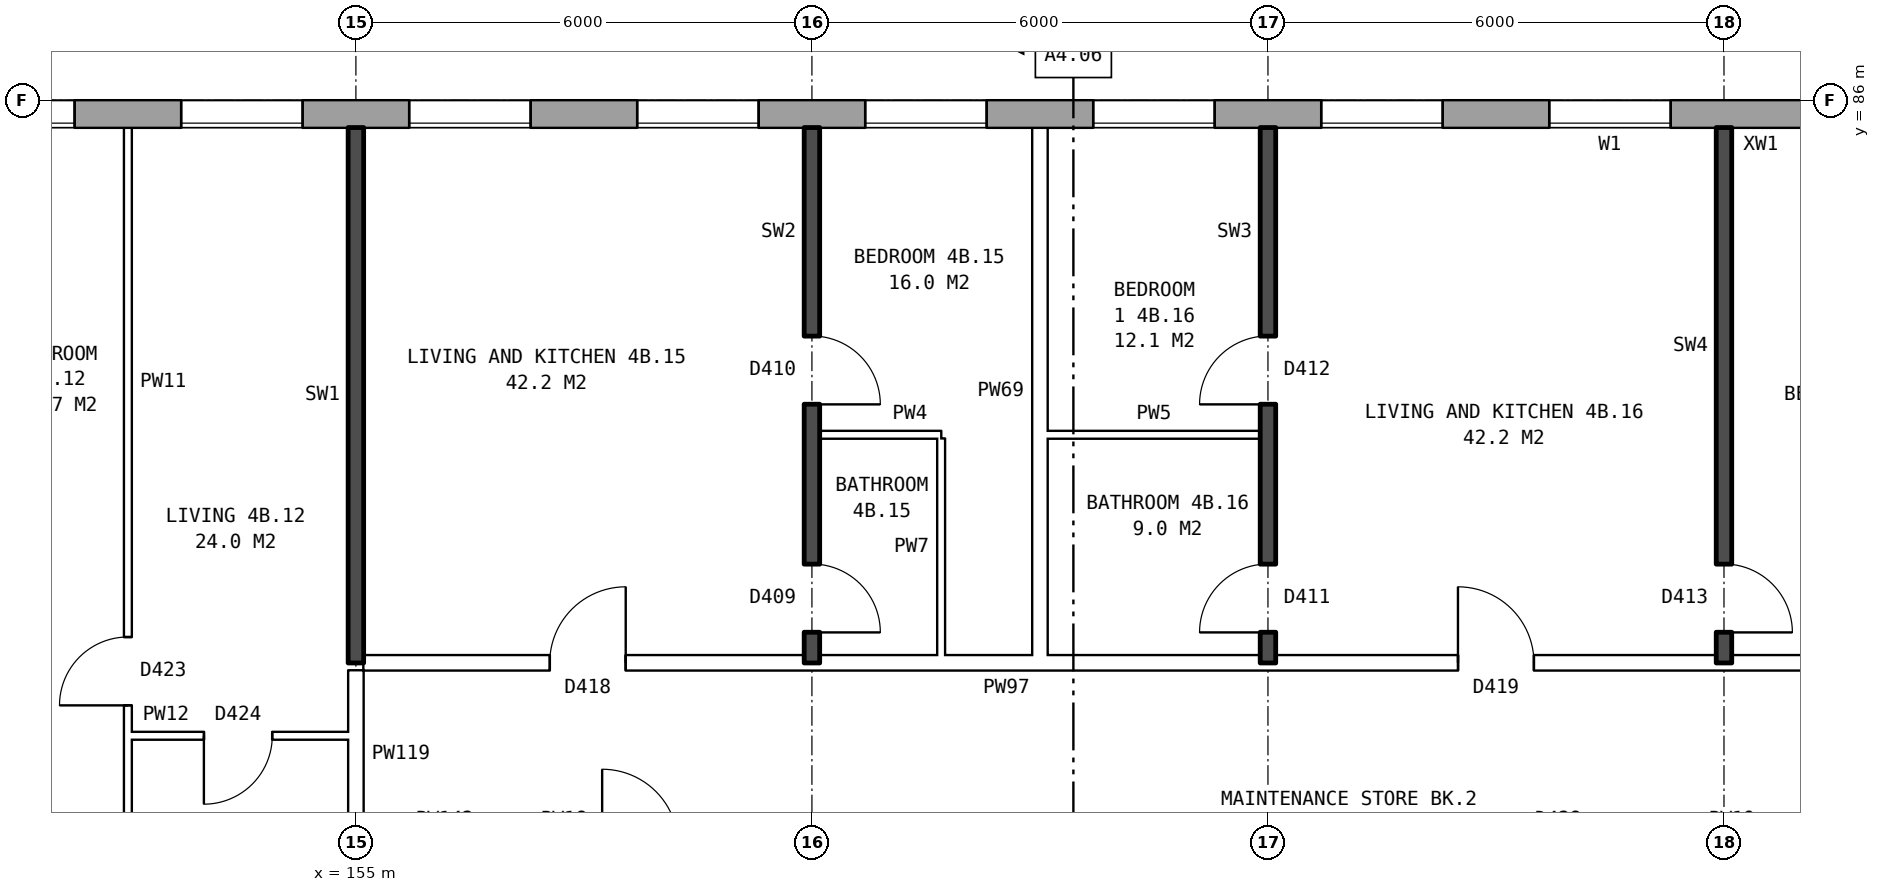
"""IFC4 building model, lengths in metres.
Left out: names, types, materials, properties, quantities, classifications, styles, units other than length and angle.
Written with IfcOpenShell. Run it as: python <this file> out.ifc"""

import sys

from ifc_helpers import new_model, si_unit, direction, frame, frame_2d, origin, place, context, subcontext, project, spatial, rectangle, extrude, element, fill, save


model = new_model("IFC4")
c1 = context("Model", 3, precision=1e-05, world=origin(), true_north=direction((0.0, 1.0)))
c2 = subcontext(c1, "Body", "Model", "MODEL_VIEW")
j1 = project(units=[si_unit("LENGTHUNIT", "METRE"), si_unit("PLANEANGLEUNIT", "RADIAN")], contexts=[c1])
p1 = place(None, origin())
s1 = spatial("IfcSite", under=j1, at=p1, CompositionType="ELEMENT")
p2 = place(p1, origin())
s2 = spatial("IfcBuilding", under=s1, at=p2, CompositionType="ELEMENT")
p3 = place(p2, frame((0.0, 0.0, 19.5)))
s3 = spatial("IfcBuildingStorey", under=s2, at=p3, CompositionType="ELEMENT", Elevation=19.5)
p4 = place(p3, frame((174.675, 85.82, 0.0), z_axis=(0.0, 0.0, 1.0), x_axis=(-1.0, 0.0, 0.0)))
e1 = element("IfcWall", 1, at=p4, inside=s3, PredefinedType="STANDARD", context=c2, shape_type="SweptSolid", body=[
    extrude(rectangle(XDim=40.601, YDim=0.36, at=frame_2d((20.3, 0.0))), origin(), (0.0, 0.0, 1.0), 2.85),
])
p5 = place(p4, frame((2.375, 0.0, 0.8)))
e2 = element("IfcOpeningElement", 2, at=p5, cuts=e1, PredefinedType="OPENING", context=c2, shape_type="SweptSolid", body=[
    extrude(rectangle(XDim=1.6, YDim=1.8, at=frame_2d((0.8, 0.9))), frame((0.0, 0.19, 0.0), z_axis=(0.0, -1.0, 0.0), x_axis=(1.0, 0.0, 0.0)), (0.0, 0.0, 1.0), 0.38),
])
p6 = place(p4, frame((5.375, 0.0, 0.8)))
e3 = element("IfcOpeningElement", 3, at=p6, cuts=e1, PredefinedType="OPENING", context=c2, shape_type="SweptSolid", body=[
    extrude(rectangle(XDim=1.6, YDim=1.8, at=frame_2d((0.8, 0.9))), frame((0.0, 0.19, 0.0), z_axis=(0.0, -1.0, 0.0), x_axis=(1.0, 0.0, 0.0)), (0.0, 0.0, 1.0), 0.38),
])
p7 = place(p4, frame((8.375, 0.0, 0.8)))
e4 = element("IfcOpeningElement", 4, at=p7, cuts=e1, PredefinedType="OPENING", context=c2, shape_type="SweptSolid", body=[
    extrude(rectangle(XDim=1.6, YDim=1.8, at=frame_2d((0.8, 0.9))), frame((0.0, 0.19, 0.0), z_axis=(0.0, -1.0, 0.0), x_axis=(1.0, 0.0, 0.0)), (0.0, 0.0, 1.0), 0.38),
])
p8 = place(p4, frame((11.375, 0.0, 0.8)))
e5 = element("IfcOpeningElement", 5, at=p8, cuts=e1, PredefinedType="OPENING", context=c2, shape_type="SweptSolid", body=[
    extrude(rectangle(XDim=1.6, YDim=1.8, at=frame_2d((0.8, 0.9))), frame((0.0, 0.19, 0.0), z_axis=(0.0, -1.0, 0.0), x_axis=(1.0, 0.0, 0.0)), (0.0, 0.0, 1.0), 0.38),
])
p9 = place(p4, frame((14.375, 0.0, 0.8)))
e6 = element("IfcOpeningElement", 6, at=p9, cuts=e1, PredefinedType="OPENING", context=c2, shape_type="SweptSolid", body=[
    extrude(rectangle(XDim=1.6, YDim=1.8, at=frame_2d((0.8, 0.9))), frame((0.0, 0.19, 0.0), z_axis=(0.0, -1.0, 0.0), x_axis=(1.0, 0.0, 0.0)), (0.0, 0.0, 1.0), 0.38),
])
p10 = place(p4, frame((17.375, 0.0, 0.8)))
e7 = element("IfcOpeningElement", 7, at=p10, cuts=e1, PredefinedType="OPENING", context=c2, shape_type="SweptSolid", body=[
    extrude(rectangle(XDim=1.6, YDim=1.8, at=frame_2d((0.8, 0.9))), frame((0.0, 0.19, 0.0), z_axis=(0.0, -1.0, 0.0), x_axis=(1.0, 0.0, 0.0)), (0.0, 0.0, 1.0), 0.38),
])
p11 = place(p4, frame((20.375, 0.0, 0.8)))
e8 = element("IfcOpeningElement", 8, at=p11, cuts=e1, PredefinedType="OPENING", context=c2, shape_type="SweptSolid", body=[
    extrude(rectangle(XDim=1.6, YDim=1.8, at=frame_2d((0.8, 0.9))), frame((0.0, 0.19, 0.0), z_axis=(0.0, -1.0, 0.0), x_axis=(1.0, 0.0, 0.0)), (0.0, 0.0, 1.0), 0.38),
])
p12 = place(p4, frame((23.375, 0.0, 0.8)))
e9 = element("IfcOpeningElement", 9, at=p12, cuts=e1, PredefinedType="OPENING", context=c2, shape_type="SweptSolid", body=[
    extrude(rectangle(XDim=1.6, YDim=1.8, at=frame_2d((0.8, 0.9))), frame((0.0, 0.19, 0.0), z_axis=(0.0, -1.0, 0.0), x_axis=(1.0, 0.0, 0.0)), (0.0, 0.0, 1.0), 0.38),
])
p13 = place(p4, frame((26.375, 0.0, 0.8)))
e10 = element("IfcOpeningElement", 10, at=p13, cuts=e1, PredefinedType="OPENING", context=c2, shape_type="SweptSolid", body=[
    extrude(rectangle(XDim=1.6, YDim=1.8, at=frame_2d((0.8, 0.9))), frame((0.0, 0.19, 0.0), z_axis=(0.0, -1.0, 0.0), x_axis=(1.0, 0.0, 0.0)), (0.0, 0.0, 1.0), 0.38),
])
p14 = place(p4, frame((29.375, 0.0, 0.8)))
e11 = element("IfcOpeningElement", 11, at=p14, cuts=e1, PredefinedType="OPENING", context=c2, shape_type="SweptSolid", body=[
    extrude(rectangle(XDim=1.6, YDim=1.8, at=frame_2d((0.8, 0.9))), frame((0.0, 0.19, 0.0), z_axis=(0.0, -1.0, 0.0), x_axis=(1.0, 0.0, 0.0)), (0.0, 0.0, 1.0), 0.38),
])
p15 = place(p4, frame((32.375, 0.0, 0.8)))
e12 = element("IfcOpeningElement", 12, at=p15, cuts=e1, PredefinedType="OPENING", context=c2, shape_type="SweptSolid", body=[
    extrude(rectangle(XDim=1.6, YDim=1.8, at=frame_2d((0.8, 0.9))), frame((0.0, 0.19, 0.0), z_axis=(0.0, -1.0, 0.0), x_axis=(1.0, 0.0, 0.0)), (0.0, 0.0, 1.0), 0.38),
])
p16 = place(p4, frame((35.375, 0.0, 0.8)))
e13 = element("IfcOpeningElement", 13, at=p16, cuts=e1, PredefinedType="OPENING", context=c2, shape_type="SweptSolid", body=[
    extrude(rectangle(XDim=1.6, YDim=1.8, at=frame_2d((0.8, 0.9))), frame((0.0, 0.19, 0.0), z_axis=(0.0, -1.0, 0.0), x_axis=(1.0, 0.0, 0.0)), (0.0, 0.0, 1.0), 0.38),
])
p17 = place(p4, frame((37.875, 0.0, 0.8)))
e14 = element("IfcOpeningElement", 14, at=p17, cuts=e1, PredefinedType="OPENING", context=c2, shape_type="SweptSolid", body=[
    extrude(rectangle(XDim=1.2, YDim=1.8, at=frame_2d((0.6, 0.9))), frame((0.0, 0.19, 0.0), z_axis=(0.0, -1.0, 0.0), x_axis=(1.0, 0.0, 0.0)), (0.0, 0.0, 1.0), 0.38),
])
p18 = place(p4, frame((39.375, 0.0, 0.8)))
e15 = element("IfcOpeningElement", 15, at=p18, cuts=e1, PredefinedType="OPENING", context=c2, shape_type="SweptSolid", body=[
    extrude(rectangle(XDim=0.6, YDim=1.2, at=frame_2d((0.3, 0.6))), frame((0.0, 0.19, 0.0), z_axis=(0.0, -1.0, 0.0), x_axis=(1.0, 0.0, 0.0)), (0.0, 0.0, 1.0), 0.38),
])
p19 = place(p3, frame((152.0, 77.64, 0.0), z_axis=(0.0, 0.0, 1.0), x_axis=(1.0, 0.0, 0.0)))
e16 = element("IfcWall", 16, at=p19, inside=s3, PredefinedType="PARTITIONING", context=c2, shape_type="SweptSolid", body=[
    extrude(rectangle(XDim=2.9, YDim=0.1, at=frame_2d((1.45, 0.0))), origin(), (0.0, 0.0, 1.0), 2.85),
])
p20 = place(p19, frame((1.0, 0.0, 0.0)))
e17 = element("IfcOpeningElement", 17, at=p20, cuts=e16, PredefinedType="OPENING", context=c2, shape_type="SweptSolid", body=[
    extrude(rectangle(XDim=0.9, YDim=2.1, at=frame_2d((0.45, 1.05))), frame((0.0, 0.06, 0.0), z_axis=(0.0, -1.0, 0.0), x_axis=(1.0, 0.0, 0.0)), (0.0, 0.0, 1.0), 0.12),
])
p21 = place(p3, frame((155.1, 78.6, 0.0), z_axis=(0.0, 0.0, 1.0), x_axis=(1.0, 0.0, 0.0)))
e18 = element("IfcWall", 18, at=p21, inside=s3, PredefinedType="PARTITIONING", context=c2, shape_type="SweptSolid", body=[
    extrude(rectangle(XDim=22.29, YDim=0.2, at=frame_2d((11.145, 0.0))), origin(), (0.0, 0.0, 1.0), 2.85),
])
p22 = place(p21, frame((2.45, 0.0, 0.0)))
e19 = element("IfcOpeningElement", 19, at=p22, cuts=e18, PredefinedType="OPENING", context=c2, shape_type="SweptSolid", body=[
    extrude(rectangle(XDim=1.0, YDim=2.1, at=frame_2d((0.5, 1.05))), frame((0.0, 0.11, 0.0), z_axis=(0.0, -1.0, 0.0), x_axis=(1.0, 0.0, 0.0)), (0.0, 0.0, 1.0), 0.22),
])
p23 = place(p21, frame((14.4, 0.0, 0.0)))
e20 = element("IfcOpeningElement", 20, at=p23, cuts=e18, PredefinedType="OPENING", context=c2, shape_type="SweptSolid", body=[
    extrude(rectangle(XDim=1.0, YDim=2.1, at=frame_2d((0.5, 1.05))), frame((0.0, 0.11, 0.0), z_axis=(0.0, -1.0, 0.0), x_axis=(1.0, 0.0, 0.0)), (0.0, 0.0, 1.0), 0.22),
])
p24 = place(p3, frame((161.1, 81.6, 0.0), z_axis=(0.0, 0.0, 1.0), x_axis=(1.0, 0.0, 0.0)))
e21 = element("IfcWall", 21, at=p24, inside=s3, PredefinedType="PARTITIONING", context=c2, shape_type="SweptSolid", body=[
    extrude(rectangle(XDim=1.6, YDim=0.1, at=frame_2d((0.8, 0.0))), origin(), (0.0, 0.0, 1.0), 2.85),
])
p25 = place(p3, frame((164.1, 81.6, 0.0), z_axis=(0.0, 0.0, 1.0), x_axis=(1.0, 0.0, 0.0)))
e22 = element("IfcWall", 22, at=p25, inside=s3, PredefinedType="PARTITIONING", context=c2, shape_type="SweptSolid", body=[
    extrude(rectangle(XDim=2.8, YDim=0.1, at=frame_2d((1.4, 0.0))), origin(), (0.0, 0.0, 1.0), 2.85),
])
p26 = place(p3, frame((152.0, 71.3, 0.0), z_axis=(0.0, 0.0, 1.0), x_axis=(0.0, 1.0, 0.0)))
e23 = element("IfcWall", 23, at=p26, inside=s3, PredefinedType="PARTITIONING", context=c2, shape_type="SweptSolid", body=[
    extrude(rectangle(XDim=14.34, YDim=0.1, at=frame_2d((7.17, 0.0))), origin(), (0.0, 0.0, 1.0), 2.85),
])
p27 = place(p26, frame((6.74, 0.0, 0.0)))
e24 = element("IfcOpeningElement", 24, at=p27, cuts=e23, PredefinedType="OPENING", context=c2, shape_type="SweptSolid", body=[
    extrude(rectangle(XDim=0.9, YDim=2.1, at=frame_2d((0.45, 1.05))), frame((0.0, 0.06, 0.0), z_axis=(0.0, -1.0, 0.0), x_axis=(1.0, 0.0, 0.0)), (0.0, 0.0, 1.0), 0.12),
])
p28 = place(p26, frame((0.4, 0.0, 0.0)))
e25 = element("IfcOpeningElement", 25, at=p28, cuts=e23, PredefinedType="OPENING", context=c2, shape_type="SweptSolid", body=[
    extrude(rectangle(XDim=0.9, YDim=2.1, at=frame_2d((0.45, 1.05))), frame((0.0, 0.06, 0.0), z_axis=(0.0, -1.0, 0.0), x_axis=(1.0, 0.0, 0.0)), (0.0, 0.0, 1.0), 0.12),
])
p29 = place(p3, frame((155.0, 76.3, 0.0), z_axis=(0.0, 0.0, 1.0), x_axis=(0.0, 1.0, 0.0)))
e26 = element("IfcWall", 26, at=p29, inside=s3, PredefinedType="PARTITIONING", context=c2, shape_type="SweptSolid", body=[
    extrude(rectangle(XDim=2.2, YDim=0.2, at=frame_2d((1.1, 0.0))), origin(), (0.0, 0.0, 1.0), 2.85),
])
p30 = place(p3, frame((155.0, 78.6, 0.0), z_axis=(0.0, 0.0, 1.0), x_axis=(0.0, 1.0, 0.0)))
e27 = element("IfcWall", 27, at=p30, inside=s3, PredefinedType="SOLIDWALL", context=c2, shape_type="SweptSolid", body=[
    extrude(rectangle(XDim=7.04, YDim=0.2, at=frame_2d((3.52, 0.0))), origin(), (0.0, 0.0, 1.0), 2.85),
])
p31 = place(p3, frame((161.0, 78.6, 0.0), z_axis=(0.0, 0.0, 1.0), x_axis=(0.0, 1.0, 0.0)))
e28 = element("IfcWall", 28, at=p31, inside=s3, PredefinedType="SOLIDWALL", context=c2, shape_type="SweptSolid", body=[
    extrude(rectangle(XDim=7.04, YDim=0.2, at=frame_2d((3.52, 0.0))), origin(), (0.0, 0.0, 1.0), 2.85),
])
p32 = place(p31, frame((3.4, 0.0, 0.0)))
e29 = element("IfcOpeningElement", 29, at=p32, cuts=e28, PredefinedType="OPENING", context=c2, shape_type="SweptSolid", body=[
    extrude(rectangle(XDim=0.9, YDim=2.1, at=frame_2d((0.45, 1.05))), frame((0.0, 0.11, 0.0), z_axis=(0.0, -1.0, 0.0), x_axis=(1.0, 0.0, 0.0)), (0.0, 0.0, 1.0), 0.22),
])
p33 = place(p31, frame((0.4, 0.0, 0.0)))
e30 = element("IfcOpeningElement", 30, at=p33, cuts=e28, PredefinedType="OPENING", context=c2, shape_type="SweptSolid", body=[
    extrude(rectangle(XDim=0.9, YDim=2.1, at=frame_2d((0.45, 1.05))), frame((0.0, 0.11, 0.0), z_axis=(0.0, -1.0, 0.0), x_axis=(1.0, 0.0, 0.0)), (0.0, 0.0, 1.0), 0.22),
])
p34 = place(p3, frame((162.7, 78.7, 0.0), z_axis=(0.0, 0.0, 1.0), x_axis=(0.0, 1.0, 0.0)))
e31 = element("IfcWall", 31, at=p34, inside=s3, PredefinedType="PARTITIONING", context=c2, shape_type="SweptSolid", body=[
    extrude(rectangle(XDim=2.85, YDim=0.1, at=frame_2d((1.425, 0.0))), origin(), (0.0, 0.0, 1.0), 2.85),
])
p35 = place(p3, frame((164.0, 78.7, 0.0), z_axis=(0.0, 0.0, 1.0), x_axis=(0.0, 1.0, 0.0)))
e32 = element("IfcWall", 32, at=p35, inside=s3, PredefinedType="PARTITIONING", context=c2, shape_type="SweptSolid", body=[
    extrude(rectangle(XDim=6.94, YDim=0.2, at=frame_2d((3.47, 0.0))), origin(), (0.0, 0.0, 1.0), 2.85),
])
p36 = place(p3, frame((167.0, 78.6, 0.0), z_axis=(0.0, 0.0, 1.0), x_axis=(0.0, 1.0, 0.0)))
e33 = element("IfcWall", 33, at=p36, inside=s3, PredefinedType="SOLIDWALL", context=c2, shape_type="SweptSolid", body=[
    extrude(rectangle(XDim=7.04, YDim=0.2, at=frame_2d((3.52, 0.0))), origin(), (0.0, 0.0, 1.0), 2.85),
])
p37 = place(p36, frame((3.4, 0.0, 0.0)))
e34 = element("IfcOpeningElement", 34, at=p37, cuts=e33, PredefinedType="OPENING", context=c2, shape_type="SweptSolid", body=[
    extrude(rectangle(XDim=0.9, YDim=2.1, at=frame_2d((0.45, 1.05))), frame((0.0, 0.11, 0.0), z_axis=(0.0, -1.0, 0.0), x_axis=(1.0, 0.0, 0.0)), (0.0, 0.0, 1.0), 0.22),
])
p38 = place(p36, frame((0.4, 0.0, 0.0)))
e35 = element("IfcOpeningElement", 35, at=p38, cuts=e33, PredefinedType="OPENING", context=c2, shape_type="SweptSolid", body=[
    extrude(rectangle(XDim=0.9, YDim=2.1, at=frame_2d((0.45, 1.05))), frame((0.0, 0.11, 0.0), z_axis=(0.0, -1.0, 0.0), x_axis=(1.0, 0.0, 0.0)), (0.0, 0.0, 1.0), 0.22),
])
p39 = place(p3, frame((173.0, 78.6, 0.0), z_axis=(0.0, 0.0, 1.0), x_axis=(0.0, 1.0, 0.0)))
e36 = element("IfcWall", 36, at=p39, inside=s3, PredefinedType="SOLIDWALL", context=c2, shape_type="SweptSolid", body=[
    extrude(rectangle(XDim=7.04, YDim=0.2, at=frame_2d((3.52, 0.0))), origin(), (0.0, 0.0, 1.0), 2.85),
])
p40 = place(p39, frame((0.4, 0.0, 0.0)))
e37 = element("IfcOpeningElement", 37, at=p40, cuts=e36, PredefinedType="OPENING", context=c2, shape_type="SweptSolid", body=[
    extrude(rectangle(XDim=0.9, YDim=2.1, at=frame_2d((0.45, 1.05))), frame((0.0, 0.11, 0.0), z_axis=(0.0, -1.0, 0.0), x_axis=(1.0, 0.0, 0.0)), (0.0, 0.0, 1.0), 0.22),
])
p41 = place(p5, origin())
e38 = element("IfcWindow", 38, at=p41, inside=s3, PartitioningType="SINGLE_PANEL", PredefinedType="WINDOW", context=c2, shape_type="SweptSolid", body=[
    extrude(rectangle(XDim=1.6, YDim=1.8, at=frame_2d((0.8, 0.9))), frame((0.0, 0.15, 0.0), z_axis=(0.0, -1.0, 0.0), x_axis=(1.0, 0.0, 0.0)), (0.0, 0.0, 1.0), 0.06),
])
fill(e2, e38)
p42 = place(p6, origin())
e39 = element("IfcWindow", 39, at=p42, inside=s3, PartitioningType="SINGLE_PANEL", PredefinedType="WINDOW", context=c2, shape_type="SweptSolid", body=[
    extrude(rectangle(XDim=1.6, YDim=1.8, at=frame_2d((0.8, 0.9))), frame((0.0, 0.15, 0.0), z_axis=(0.0, -1.0, 0.0), x_axis=(1.0, 0.0, 0.0)), (0.0, 0.0, 1.0), 0.06),
])
fill(e3, e39)
p43 = place(p7, origin())
e40 = element("IfcWindow", 40, at=p43, inside=s3, PartitioningType="SINGLE_PANEL", PredefinedType="WINDOW", context=c2, shape_type="SweptSolid", body=[
    extrude(rectangle(XDim=1.6, YDim=1.8, at=frame_2d((0.8, 0.9))), frame((0.0, 0.15, 0.0), z_axis=(0.0, -1.0, 0.0), x_axis=(1.0, 0.0, 0.0)), (0.0, 0.0, 1.0), 0.06),
])
fill(e4, e40)
p44 = place(p8, origin())
e41 = element("IfcWindow", 41, at=p44, inside=s3, PartitioningType="SINGLE_PANEL", PredefinedType="WINDOW", context=c2, shape_type="SweptSolid", body=[
    extrude(rectangle(XDim=1.6, YDim=1.8, at=frame_2d((0.8, 0.9))), frame((0.0, 0.15, 0.0), z_axis=(0.0, -1.0, 0.0), x_axis=(1.0, 0.0, 0.0)), (0.0, 0.0, 1.0), 0.06),
])
fill(e5, e41)
p45 = place(p9, origin())
e42 = element("IfcWindow", 42, at=p45, inside=s3, PartitioningType="SINGLE_PANEL", PredefinedType="WINDOW", context=c2, shape_type="SweptSolid", body=[
    extrude(rectangle(XDim=1.6, YDim=1.8, at=frame_2d((0.8, 0.9))), frame((0.0, 0.15, 0.0), z_axis=(0.0, -1.0, 0.0), x_axis=(1.0, 0.0, 0.0)), (0.0, 0.0, 1.0), 0.06),
])
fill(e6, e42)
p46 = place(p10, origin())
e43 = element("IfcWindow", 43, at=p46, inside=s3, PartitioningType="SINGLE_PANEL", PredefinedType="WINDOW", context=c2, shape_type="SweptSolid", body=[
    extrude(rectangle(XDim=1.6, YDim=1.8, at=frame_2d((0.8, 0.9))), frame((0.0, 0.15, 0.0), z_axis=(0.0, -1.0, 0.0), x_axis=(1.0, 0.0, 0.0)), (0.0, 0.0, 1.0), 0.06),
])
fill(e7, e43)
p47 = place(p11, origin())
e44 = element("IfcWindow", 44, at=p47, inside=s3, PartitioningType="SINGLE_PANEL", PredefinedType="WINDOW", context=c2, shape_type="SweptSolid", body=[
    extrude(rectangle(XDim=1.6, YDim=1.8, at=frame_2d((0.8, 0.9))), frame((0.0, 0.15, 0.0), z_axis=(0.0, -1.0, 0.0), x_axis=(1.0, 0.0, 0.0)), (0.0, 0.0, 1.0), 0.06),
])
fill(e8, e44)
p48 = place(p12, origin())
e45 = element("IfcWindow", 45, at=p48, inside=s3, PartitioningType="SINGLE_PANEL", PredefinedType="WINDOW", context=c2, shape_type="SweptSolid", body=[
    extrude(rectangle(XDim=1.6, YDim=1.8, at=frame_2d((0.8, 0.9))), frame((0.0, 0.15, 0.0), z_axis=(0.0, -1.0, 0.0), x_axis=(1.0, 0.0, 0.0)), (0.0, 0.0, 1.0), 0.06),
])
fill(e9, e45)
p49 = place(p27, origin())
e46 = element("IfcDoor", 46, at=p49, inside=s3, OperationType="SINGLE_SWING_LEFT", PredefinedType="DOOR", context=c2, shape_type="SweptSolid", body=[
    extrude(rectangle(XDim=0.9, YDim=2.1, at=frame_2d((0.45, 1.05))), frame((0.0, 0.025, 0.0), z_axis=(0.0, -1.0, 0.0), x_axis=(1.0, 0.0, 0.0)), (0.0, 0.0, 1.0), 0.05),
])
fill(e24, e46)
p50 = place(p20, frame((0.9, 0.0, 0.0), z_axis=(0.0, 0.0, 1.0), x_axis=(-1.0, 0.0, 0.0)))
e47 = element("IfcDoor", 47, at=p50, inside=s3, OperationType="SINGLE_SWING_RIGHT", PredefinedType="DOOR", context=c2, shape_type="SweptSolid", body=[
    extrude(rectangle(XDim=0.9, YDim=2.1, at=frame_2d((0.45, 1.05))), frame((0.0, 0.025, 0.0), z_axis=(0.0, -1.0, 0.0), x_axis=(1.0, 0.0, 0.0)), (0.0, 0.0, 1.0), 0.05),
])
fill(e17, e47)
p51 = place(p32, frame((0.9, 0.0, 0.0), z_axis=(0.0, 0.0, 1.0), x_axis=(-1.0, 0.0, 0.0)))
e48 = element("IfcDoor", 48, at=p51, inside=s3, OperationType="SINGLE_SWING_RIGHT", PredefinedType="DOOR", context=c2, shape_type="SweptSolid", body=[
    extrude(rectangle(XDim=0.9, YDim=2.1, at=frame_2d((0.45, 1.05))), frame((0.0, 0.025, 0.0), z_axis=(0.0, -1.0, 0.0), x_axis=(1.0, 0.0, 0.0)), (0.0, 0.0, 1.0), 0.05),
])
fill(e29, e48)
p52 = place(p22, origin())
e49 = element("IfcDoor", 49, at=p52, inside=s3, OperationType="SINGLE_SWING_RIGHT", PredefinedType="DOOR", context=c2, shape_type="SweptSolid", body=[
    extrude(rectangle(XDim=1.0, YDim=2.1, at=frame_2d((0.5, 1.05))), frame((0.0, 0.025, 0.0), z_axis=(0.0, -1.0, 0.0), x_axis=(1.0, 0.0, 0.0)), (0.0, 0.0, 1.0), 0.05),
])
fill(e19, e49)
p53 = place(p33, frame((0.9, 0.0, 0.0), z_axis=(0.0, 0.0, 1.0), x_axis=(-1.0, 0.0, 0.0)))
e50 = element("IfcDoor", 50, at=p53, inside=s3, OperationType="SINGLE_SWING_RIGHT", PredefinedType="DOOR", context=c2, shape_type="SweptSolid", body=[
    extrude(rectangle(XDim=0.9, YDim=2.1, at=frame_2d((0.45, 1.05))), frame((0.0, 0.025, 0.0), z_axis=(0.0, -1.0, 0.0), x_axis=(1.0, 0.0, 0.0)), (0.0, 0.0, 1.0), 0.05),
])
fill(e30, e50)
p54 = place(p37, origin())
e51 = element("IfcDoor", 51, at=p54, inside=s3, OperationType="SINGLE_SWING_LEFT", PredefinedType="DOOR", context=c2, shape_type="SweptSolid", body=[
    extrude(rectangle(XDim=0.9, YDim=2.1, at=frame_2d((0.45, 1.05))), frame((0.0, 0.025, 0.0), z_axis=(0.0, -1.0, 0.0), x_axis=(1.0, 0.0, 0.0)), (0.0, 0.0, 1.0), 0.05),
])
fill(e34, e51)
p55 = place(p40, frame((0.9, 0.0, 0.0), z_axis=(0.0, 0.0, 1.0), x_axis=(-1.0, 0.0, 0.0)))
e52 = element("IfcDoor", 52, at=p55, inside=s3, OperationType="SINGLE_SWING_RIGHT", PredefinedType="DOOR", context=c2, shape_type="SweptSolid", body=[
    extrude(rectangle(XDim=0.9, YDim=2.1, at=frame_2d((0.45, 1.05))), frame((0.0, 0.025, 0.0), z_axis=(0.0, -1.0, 0.0), x_axis=(1.0, 0.0, 0.0)), (0.0, 0.0, 1.0), 0.05),
])
fill(e37, e52)
p56 = place(p23, origin())
e53 = element("IfcDoor", 53, at=p56, inside=s3, OperationType="SINGLE_SWING_LEFT", PredefinedType="DOOR", context=c2, shape_type="SweptSolid", body=[
    extrude(rectangle(XDim=1.0, YDim=2.1, at=frame_2d((0.5, 1.05))), frame((0.0, 0.025, 0.0), z_axis=(0.0, -1.0, 0.0), x_axis=(1.0, 0.0, 0.0)), (0.0, 0.0, 1.0), 0.05),
])
fill(e20, e53)
p57 = place(p38, origin())
e54 = element("IfcDoor", 54, at=p57, inside=s3, OperationType="SINGLE_SWING_LEFT", PredefinedType="DOOR", context=c2, shape_type="SweptSolid", body=[
    extrude(rectangle(XDim=0.9, YDim=2.1, at=frame_2d((0.45, 1.05))), frame((0.0, 0.025, 0.0), z_axis=(0.0, -1.0, 0.0), x_axis=(1.0, 0.0, 0.0)), (0.0, 0.0, 1.0), 0.05),
])
fill(e35, e54)
save(model, sys.argv[1])
